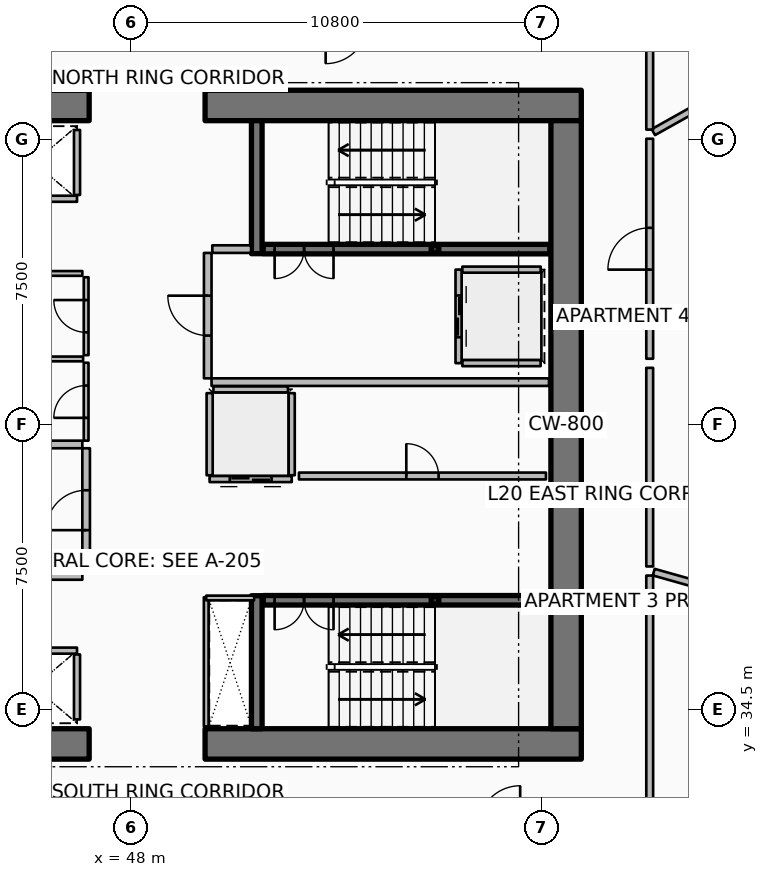
"""IFC4 building model, lengths in metres.
Left out: names, types, materials, properties, quantities, classifications, styles, units other than length and angle.
Written with IfcOpenShell. Run it as: python <this file> out.ifc"""

import sys

from ifc_helpers import new_model, si_unit, direction, frame, frame_2d, origin, origin_2d, place, context, subcontext, project, spatial, rectangle, hollow_rectangle, extrude, element, fill, save


model = new_model("IFC4")
c1 = context("Model", 3, precision=1e-05, world=origin(), true_north=direction((0.0, 1.0)))
c2 = subcontext(c1, "Body", "Model", "MODEL_VIEW")
j1 = project(units=[si_unit("LENGTHUNIT", "METRE"), si_unit("PLANEANGLEUNIT", "RADIAN")], contexts=[c1])
p1 = place(None, origin())
s1 = spatial("IfcSite", under=j1, at=p1, CompositionType="ELEMENT")
p2 = place(p1, origin())
s2 = spatial("IfcBuilding", under=s1, at=p2, CompositionType="ELEMENT")
p3 = place(p2, frame((0.0, 0.0, 82.65)))
s3 = spatial("IfcBuildingStorey", under=s2, at=p3, CompositionType="ELEMENT", Elevation=82.65)
p4 = place(p3, frame((37.0, 33.6, 0.0), z_axis=(0.0, 0.0, 1.0), x_axis=(1.0, 0.0, 0.0)))
e1 = element("IfcWall", 1, at=p4, inside=s3, PredefinedType="SHEAR", context=c2, shape_type="SweptSolid", body=[
    extrude(rectangle(XDim=9.9, YDim=0.8, at=frame_2d((4.95, 0.0))), origin(), (0.0, 0.0, 1.0), 3.75),
])
p5 = place(p3, frame((49.95, 33.6, 0.0), z_axis=(0.0, 0.0, 1.0), x_axis=(1.0, 0.0, 0.0)))
e2 = element("IfcWall", 2, at=p5, inside=s3, PredefinedType="SHEAR", context=c2, shape_type="SweptSolid", body=[
    extrude(rectangle(XDim=9.9, YDim=0.8, at=frame_2d((4.95, 0.0))), origin(), (0.0, 0.0, 1.0), 3.75),
])
p6 = place(p3, frame((37.0, 50.4, 0.0), z_axis=(0.0, 0.0, 1.0), x_axis=(1.0, 0.0, 0.0)))
e3 = element("IfcWall", 3, at=p6, inside=s3, PredefinedType="SHEAR", context=c2, shape_type="SweptSolid", body=[
    extrude(rectangle(XDim=9.9, YDim=0.8, at=frame_2d((4.95, 0.0))), origin(), (0.0, 0.0, 1.0), 3.75),
])
p7 = place(p3, frame((49.95, 50.4, 0.0), z_axis=(0.0, 0.0, 1.0), x_axis=(1.0, 0.0, 0.0)))
e4 = element("IfcWall", 4, at=p7, inside=s3, PredefinedType="SHEAR", context=c2, shape_type="SweptSolid", body=[
    extrude(rectangle(XDim=9.9, YDim=0.8, at=frame_2d((4.95, 0.0))), origin(), (0.0, 0.0, 1.0), 3.75),
])
p8 = place(p3, frame((59.45, 34.0, 0.0), z_axis=(0.0, 0.0, 1.0), x_axis=(0.0, 1.0, 0.0)))
e5 = element("IfcWall", 5, at=p8, inside=s3, PredefinedType="SHEAR", context=c2, shape_type="SweptSolid", body=[
    extrude(rectangle(XDim=16.0, YDim=0.8, at=frame_2d((8.0, 0.0))), origin(), (0.0, 0.0, 1.0), 3.75),
])
for number, where, z_axis, x_axis in (
    (6, (51.31, 46.5, 0.0), (0.0, 0.0, 1.0), (0.0, 1.0, 0.0)),
    (7, (51.31, 34.0, 0.0), (0.0, 0.0, 1.0), (0.0, 1.0, 0.0)),
):
    element("IfcWall", number, at=place(p3, frame(where, z_axis=z_axis, x_axis=x_axis)), inside=s3, PredefinedType="SHEAR", context=c2, shape_type="SweptSolid", body=[
        extrude(rectangle(XDim=3.5, YDim=0.28, at=frame_2d((1.75, 0.0))), origin(), (0.0, 0.0, 1.0), 3.75),
    ])
for number, where, z_axis, x_axis in (
    (8, (56.0, 46.62, 0.0), (0.0, 0.0, 1.0), (1.0, 0.0, 0.0)),
    (9, (56.0, 37.38, 0.0), (0.0, 0.0, 1.0), (1.0, 0.0, 0.0)),
):
    element("IfcColumn", number, at=place(p3, frame(where, z_axis=z_axis, x_axis=x_axis)), inside=s3, PredefinedType="COLUMN", context=c2, shape_type="SweptSolid", body=[
        extrude(hollow_rectangle(XDim=0.2, YDim=0.2, WallThickness=0.01, InnerFilletRadius=0.01, OuterFilletRadius=0.02, at=origin_2d()), origin(), (0.0, 0.0, 1.0), 1.67),
    ])
p9 = place(p3, frame((51.48, 46.62, 0.0), z_axis=(0.0, 0.0, 1.0), x_axis=(1.0, 0.0, 0.0)))
e10 = element("IfcWall", 10, at=p9, inside=s3, PredefinedType="SOLIDWALL", context=c2, shape_type="SweptSolid", body=[
    extrude(rectangle(XDim=7.54, YDim=0.25, at=frame_2d((3.77, 0.0))), origin(), (0.0, 0.0, 1.0), 3.5),
])
p10 = place(p9, frame((0.3, 0.0, 0.0)))
e11 = element("IfcOpeningElement", 11, at=p10, cuts=e10, PredefinedType="OPENING", context=c2, shape_type="SweptSolid", body=[
    extrude(rectangle(XDim=1.55, YDim=2.15, at=frame_2d((0.775, 1.075))), frame((0.0, 0.135, 0.0), z_axis=(0.0, -1.0, 0.0), x_axis=(1.0, 0.0, 0.0)), (0.0, 0.0, 1.0), 0.27),
])
p11 = place(p3, frame((51.48, 37.38, 0.0), z_axis=(0.0, 0.0, 1.0), x_axis=(1.0, 0.0, 0.0)))
e12 = element("IfcWall", 12, at=p11, inside=s3, PredefinedType="SOLIDWALL", context=c2, shape_type="SweptSolid", body=[
    extrude(rectangle(XDim=7.54, YDim=0.25, at=frame_2d((3.77, 0.0))), origin(), (0.0, 0.0, 1.0), 3.5),
])
p12 = place(p11, frame((0.3, 0.0, 0.0)))
e13 = element("IfcOpeningElement", 13, at=p12, cuts=e12, PredefinedType="OPENING", context=c2, shape_type="SweptSolid", body=[
    extrude(rectangle(XDim=1.55, YDim=2.15, at=frame_2d((0.775, 1.075))), frame((0.0, 0.135, 0.0), z_axis=(0.0, -1.0, 0.0), x_axis=(1.0, 0.0, 0.0)), (0.0, 0.0, 1.0), 0.27),
])
p13 = place(p3, frame((46.58, 47.945, 0.0), z_axis=(0.0, 0.0, 1.0), x_axis=(-1.0, 0.0, 0.0)))
e14 = element("IfcWall", 14, at=p13, inside=s3, PredefinedType="PARTITIONING", context=c2, shape_type="SweptSolid", body=[
    extrude(rectangle(XDim=2.26, YDim=0.16, at=frame_2d((1.13, 0.0))), origin(), (0.0, 0.0, 1.0), 3.5),
])
p14 = place(p3, frame((46.58, 48.045, 0.0), z_axis=(0.0, 0.0, 1.0), x_axis=(0.0, 1.0, 0.0)))
e15 = element("IfcWall", 15, at=p14, inside=s3, PredefinedType="PARTITIONING", context=c2, shape_type="SweptSolid", body=[
    extrude(rectangle(XDim=1.71, YDim=0.16, at=frame_2d((0.855, 0.0))), origin(), (0.0, 0.0, 1.0), 3.5),
])
p15 = place(p3, frame((44.32, 36.055, 0.0), z_axis=(0.0, 0.0, 1.0), x_axis=(1.0, 0.0, 0.0)))
e16 = element("IfcWall", 16, at=p15, inside=s3, PredefinedType="PARTITIONING", context=c2, shape_type="SweptSolid", body=[
    extrude(rectangle(XDim=2.26, YDim=0.16, at=frame_2d((1.13, 0.0))), origin(), (0.0, 0.0, 1.0), 3.5),
])
p16 = place(p3, frame((46.58, 34.245, 0.0), z_axis=(0.0, 0.0, 1.0), x_axis=(0.0, 1.0, 0.0)))
e17 = element("IfcWall", 17, at=p16, inside=s3, PredefinedType="PARTITIONING", context=c2, shape_type="SweptSolid", body=[
    extrude(rectangle(XDim=1.71, YDim=0.16, at=frame_2d((0.855, 0.0))), origin(), (0.0, 0.0, 1.0), 3.5),
])
p17 = place(p3, frame((56.62, 46.08, 0.0), z_axis=(0.0, 0.0, 1.0), x_axis=(0.0, -1.0, 0.0)))
e18 = element("IfcWall", 18, at=p17, inside=s3, PredefinedType="PARTITIONING", context=c2, shape_type="SweptSolid", body=[
    extrude(rectangle(XDim=2.46, YDim=0.16, at=frame_2d((1.23, 0.0))), origin(), (0.0, 0.0, 1.0), 3.5),
])
p18 = place(p17, frame((0.68, 0.0, 0.0)))
e19 = element("IfcOpeningElement", 19, at=p18, cuts=e18, PredefinedType="OPENING", context=c2, shape_type="SweptSolid", body=[
    extrude(rectangle(XDim=1.1, YDim=2.1, at=frame_2d((0.55, 1.05))), frame((0.0, 0.09, 0.0), z_axis=(0.0, -1.0, 0.0), x_axis=(1.0, 0.0, 0.0)), (0.0, 0.0, 1.0), 0.18),
])
for number, where, z_axis, x_axis in (
    (20, (56.72, 46.08, 0.0), (0.0, 0.0, 1.0), (1.0, 0.0, 0.0)),
    (21, (56.72, 43.62, 0.0), (0.0, 0.0, 1.0), (1.0, 0.0, 0.0)),
):
    element("IfcWall", number, at=place(p3, frame(where, z_axis=z_axis, x_axis=x_axis)), inside=s3, PredefinedType="PARTITIONING", context=c2, shape_type="SweptSolid", body=[
        extrude(rectangle(XDim=2.06, YDim=0.16, at=frame_2d((1.03, 0.0))), origin(), (0.0, 0.0, 1.0), 3.5),
    ])
p19 = place(p3, frame((52.23, 40.57, 0.0), z_axis=(0.0, 0.0, 1.0), x_axis=(-1.0, 0.0, 0.0)))
e22 = element("IfcWall", 22, at=p19, inside=s3, PredefinedType="PARTITIONING", context=c2, shape_type="SweptSolid", body=[
    extrude(rectangle(XDim=2.16, YDim=0.16, at=frame_2d((1.08, 0.0))), origin(), (0.0, 0.0, 1.0), 3.5),
])
p20 = place(p19, frame((0.53, 0.0, 0.0)))
e23 = element("IfcOpeningElement", 23, at=p20, cuts=e22, PredefinedType="OPENING", context=c2, shape_type="SweptSolid", body=[
    extrude(rectangle(XDim=1.1, YDim=2.1, at=frame_2d((0.55, 1.05))), frame((0.0, 0.09, 0.0), z_axis=(0.0, -1.0, 0.0), x_axis=(1.0, 0.0, 0.0)), (0.0, 0.0, 1.0), 0.18),
])
for number, where, z_axis, x_axis in (
    (24, (52.23, 40.67, 0.0), (0.0, 0.0, 1.0), (0.0, 1.0, 0.0)),
    (25, (50.07, 40.67, 0.0), (0.0, 0.0, 1.0), (0.0, 1.0, 0.0)),
):
    element("IfcWall", number, at=place(p3, frame(where, z_axis=z_axis, x_axis=x_axis)), inside=s3, PredefinedType="PARTITIONING", context=c2, shape_type="SweptSolid", body=[
        extrude(rectangle(XDim=2.16, YDim=0.16, at=frame_2d((1.08, 0.0))), origin(), (0.0, 0.0, 1.0), 3.5),
    ])
p21 = place(p3, frame((50.17, 42.93, 0.0), z_axis=(0.0, 0.0, 1.0), x_axis=(1.0, 0.0, 0.0)))
e26 = element("IfcWall", 26, at=p21, inside=s3, PredefinedType="PARTITIONING", context=c2, shape_type="SweptSolid", body=[
    extrude(rectangle(XDim=1.96, YDim=0.16, at=frame_2d((0.98, 0.0))), origin(), (0.0, 0.0, 1.0), 3.5),
])
p22 = place(p3, frame((52.42, 40.65, 0.0), z_axis=(0.0, 0.0, 1.0), x_axis=(1.0, 0.0, 0.0)))
e27 = element("IfcWall", 27, at=p22, inside=s3, PredefinedType="PARTITIONING", context=c2, shape_type="SweptSolid", body=[
    extrude(rectangle(XDim=6.5, YDim=0.18, at=frame_2d((3.25, 0.0))), origin(), (0.0, 0.0, 1.0), 3.5),
])
p23 = place(p22, frame((2.825, 0.0, 0.0)))
e28 = element("IfcOpeningElement", 28, at=p23, cuts=e27, PredefinedType="OPENING", context=c2, shape_type="SweptSolid", body=[
    extrude(rectangle(XDim=0.85, YDim=2.06, at=frame_2d((0.425, 1.03))), frame((0.0, 0.1, 0.0), z_axis=(0.0, -1.0, 0.0), x_axis=(1.0, 0.0, 0.0)), (0.0, 0.0, 1.0), 0.2),
])
p24 = place(p3, frame((41.35, 38.02, 0.0), z_axis=(0.0, 0.0, 1.0), x_axis=(1.0, 0.0, 0.0)))
e29 = element("IfcWall", 29, at=p24, inside=s3, PredefinedType="PARTITIONING", context=c2, shape_type="SweptSolid", body=[
    extrude(rectangle(XDim=5.37, YDim=0.2, at=frame_2d((2.685, 0.0))), origin(), (0.0, 0.0, 1.0), 3.5),
])
p25 = place(p3, frame((43.92, 41.48, 0.0), z_axis=(0.0, 0.0, 1.0), x_axis=(1.0, 0.0, 0.0)))
e30 = element("IfcWall", 30, at=p25, inside=s3, PredefinedType="PARTITIONING", context=c2, shape_type="SweptSolid", body=[
    extrude(rectangle(XDim=2.8, YDim=0.2, at=frame_2d((1.4, 0.0))), origin(), (0.0, 0.0, 1.0), 3.5),
])
p26 = place(p3, frame((46.82, 38.12, 0.0), z_axis=(0.0, 0.0, 1.0), x_axis=(0.0, 1.0, 0.0)))
e31 = element("IfcWall", 31, at=p26, inside=s3, PredefinedType="PARTITIONING", context=c2, shape_type="SweptSolid", body=[
    extrude(rectangle(XDim=3.26, YDim=0.2, at=frame_2d((1.63, 0.0))), origin(), (0.0, 0.0, 1.0), 3.5),
])
p27 = place(p26, frame((1.105, 0.0, 0.0)))
e32 = element("IfcOpeningElement", 32, at=p27, cuts=e31, PredefinedType="OPENING", context=c2, shape_type="SweptSolid", body=[
    extrude(rectangle(XDim=1.05, YDim=2.1, at=frame_2d((0.525, 1.05))), frame((0.0, 0.11, 0.0), z_axis=(0.0, -1.0, 0.0), x_axis=(1.0, 0.0, 0.0)), (0.0, 0.0, 1.0), 0.22),
])
p28 = place(p3, frame((50.12, 43.12, 0.0), z_axis=(0.0, 0.0, 1.0), x_axis=(1.0, 0.0, 0.0)))
e33 = element("IfcWall", 33, at=p28, inside=s3, PredefinedType="PARTITIONING", context=c2, shape_type="SweptSolid", body=[
    extrude(rectangle(XDim=8.88, YDim=0.2, at=frame_2d((4.44, 0.0))), origin(), (0.0, 0.0, 1.0), 3.5),
])
p29 = place(p3, frame((50.14, 46.62, 0.0), z_axis=(0.0, 0.0, 1.0), x_axis=(1.0, 0.0, 0.0)))
e34 = element("IfcWall", 34, at=p29, inside=s3, PredefinedType="PARTITIONING", context=c2, shape_type="SweptSolid", body=[
    extrude(rectangle(XDim=1.02, YDim=0.2, at=frame_2d((0.51, 0.0))), origin(), (0.0, 0.0, 1.0), 3.5),
])
p30 = place(p3, frame((50.02, 43.22, 0.0), z_axis=(0.0, 0.0, 1.0), x_axis=(0.0, 1.0, 0.0)))
e35 = element("IfcWall", 35, at=p30, inside=s3, PredefinedType="PARTITIONING", context=c2, shape_type="SweptSolid", body=[
    extrude(rectangle(XDim=3.3, YDim=0.2, at=frame_2d((1.65, 0.0))), origin(), (0.0, 0.0, 1.0), 3.5),
])
p31 = place(p30, frame((1.125, 0.0, 0.0)))
e36 = element("IfcOpeningElement", 36, at=p31, cuts=e35, PredefinedType="OPENING", context=c2, shape_type="SweptSolid", body=[
    extrude(rectangle(XDim=1.05, YDim=2.1, at=frame_2d((0.525, 1.05))), frame((0.0, 0.11, 0.0), z_axis=(0.0, -1.0, 0.0), x_axis=(1.0, 0.0, 0.0)), (0.0, 0.0, 1.0), 0.22),
])
p32 = place(p3, frame((41.36, 45.98, 0.0), z_axis=(0.0, 0.0, 1.0), x_axis=(1.0, 0.0, 0.0)))
e37 = element("IfcWall", 37, at=p32, inside=s3, PredefinedType="PARTITIONING", context=c2, shape_type="SweptSolid", body=[
    extrude(rectangle(XDim=5.36, YDim=0.125, at=frame_2d((2.68, 0.0))), origin(), (0.0, 0.0, 1.0), 2.94),
])
p33 = place(p3, frame((49.98, 34.06, 0.0), z_axis=(0.0, 0.0, 1.0), x_axis=(0.0, 1.0, 0.0)))
e38 = element("IfcWall", 38, at=p33, inside=s3, PredefinedType="PARTITIONING", context=c2, shape_type="SweptSolid", body=[
    extrude(rectangle(XDim=3.4, YDim=0.125, at=frame_2d((1.7, 0.0))), origin(), (0.0, 0.0, 1.0), 2.94),
])
p34 = place(p3, frame((49.98, 37.44, 0.0), z_axis=(0.0, 0.0, 1.0), x_axis=(1.0, 0.0, 0.0)))
e39 = element("IfcWall", 39, at=p34, inside=s3, PredefinedType="PARTITIONING", context=c2, shape_type="SweptSolid", body=[
    extrude(rectangle(XDim=1.26, YDim=0.125, at=frame_2d((0.63, 0.0))), origin(), (0.0, 0.0, 1.0), 2.94),
])
p35 = place(p3, frame((44.03, 43.73, 0.0), z_axis=(0.0, 0.0, 1.0), x_axis=(1.0, 0.0, 0.0)))
e40 = element("IfcWall", 40, at=p35, inside=s3, PredefinedType="PARTITIONING", context=c2, shape_type="SweptSolid", body=[
    extrude(rectangle(XDim=2.71, YDim=0.125, at=frame_2d((1.355, 0.0))), origin(), (0.0, 0.0, 1.0), 2.94),
])
p36 = place(p3, frame((46.82, 41.58, 0.0), z_axis=(0.0, 0.0, 1.0), x_axis=(0.0, 1.0, 0.0)))
e41 = element("IfcWall", 41, at=p36, inside=s3, PredefinedType="PARTITIONING", context=c2, shape_type="SweptSolid", body=[
    extrude(rectangle(XDim=2.05, YDim=0.125, at=frame_2d((1.025, 0.0))), origin(), (0.0, 0.0, 1.0), 2.94),
])
p37 = place(p36, frame((0.6, 0.0, 0.0)))
e42 = element("IfcOpeningElement", 42, at=p37, cuts=e41, PredefinedType="OPENING", context=c2, shape_type="SweptSolid", body=[
    extrude(rectangle(XDim=0.85, YDim=2.06, at=frame_2d((0.425, 1.03))), frame((0.0, 0.073, 0.0), z_axis=(0.0, -1.0, 0.0), x_axis=(1.0, 0.0, 0.0)), (0.0, 0.0, 1.0), 0.145),
])
p38 = place(p3, frame((46.82, 43.83, 0.0), z_axis=(0.0, 0.0, 1.0), x_axis=(0.0, 1.0, 0.0)))
e43 = element("IfcWall", 43, at=p38, inside=s3, PredefinedType="PARTITIONING", context=c2, shape_type="SweptSolid", body=[
    extrude(rectangle(XDim=2.05, YDim=0.125, at=frame_2d((1.025, 0.0))), origin(), (0.0, 0.0, 1.0), 2.94),
])
p39 = place(p38, frame((0.6, 0.0, 0.0)))
e44 = element("IfcOpeningElement", 44, at=p39, cuts=e43, PredefinedType="OPENING", context=c2, shape_type="SweptSolid", body=[
    extrude(rectangle(XDim=0.85, YDim=2.06, at=frame_2d((0.425, 1.03))), frame((0.0, 0.073, 0.0), z_axis=(0.0, -1.0, 0.0), x_axis=(1.0, 0.0, 0.0)), (0.0, 0.0, 1.0), 0.145),
])
p40 = place(p3, frame((61.746, 49.698, 0.0), z_axis=(0.0, 0.0, 1.0), x_axis=(0.872489938668, 0.488632077256, 0.0)))
e45 = element("IfcWall", 45, at=p40, inside=s3, PredefinedType="PARTITIONING", context=c2, shape_type="SweptSolid", body=[
    extrude(rectangle(XDim=13.725, YDim=0.18, at=frame_2d((6.862, 0.0))), origin(), (0.0, 0.0, 1.0), 2.94),
])
p41 = place(p3, frame((61.756, 38.12, 0.0), z_axis=(0.0, 0.0, 1.0), x_axis=(0.962455861176, -0.271438234756, 0.0)))
e46 = element("IfcWall", 46, at=p41, inside=s3, PredefinedType="PARTITIONING", context=c2, shape_type="SweptSolid", body=[
    extrude(rectangle(XDim=14.279, YDim=0.18, at=frame_2d((7.139, 0.0))), origin(), (0.0, 0.0, 1.0), 2.94),
])
p42 = place(p3, frame((61.65, 31.52, 0.0), z_axis=(0.0, 0.0, 1.0), x_axis=(0.0, 1.0, 0.0)))
e47 = element("IfcWall", 47, at=p42, inside=s3, PredefinedType="PARTITIONING", context=c2, shape_type="SweptSolid", body=[
    extrude(rectangle(XDim=6.51, YDim=0.18, at=frame_2d((3.255, 0.0))), origin(), (0.0, 0.0, 1.0), 2.94),
])
p43 = place(p3, frame((61.65, 43.736, 0.0), z_axis=(0.0, 0.0, 1.0), x_axis=(0.0, 1.0, 0.0)))
e48 = element("IfcWall", 48, at=p43, inside=s3, PredefinedType="PARTITIONING", context=c2, shape_type="SweptSolid", body=[
    extrude(rectangle(XDim=5.789, YDim=0.18, at=frame_2d((2.895, 0.0))), origin(), (0.0, 0.0, 1.0), 2.94),
])
p44 = place(p43, frame((2.344, 0.0, 0.0)))
e49 = element("IfcOpeningElement", 49, at=p44, cuts=e48, PredefinedType="OPENING", context=c2, shape_type="SweptSolid", body=[
    extrude(rectangle(XDim=1.1, YDim=2.1, at=frame_2d((0.55, 1.05))), frame((0.0, 0.1, 0.0), z_axis=(0.0, -1.0, 0.0), x_axis=(1.0, 0.0, 0.0)), (0.0, 0.0, 1.0), 0.2),
])
p45 = place(p3, frame((61.65, 38.27, 0.0), z_axis=(0.0, 0.0, 1.0), x_axis=(0.0, 1.0, 0.0)))
e50 = element("IfcWall", 50, at=p45, inside=s3, PredefinedType="PARTITIONING", context=c2, shape_type="SweptSolid", body=[
    extrude(rectangle(XDim=5.225, YDim=0.18, at=frame_2d((2.613, 0.0))), origin(), (0.0, 0.0, 1.0), 2.94),
])
p46 = place(p3, frame((61.65, 49.764, 0.0), z_axis=(0.0, 0.0, 1.0), x_axis=(0.0, 1.0, 0.0)))
e51 = element("IfcWall", 51, at=p46, inside=s3, PredefinedType="PARTITIONING", context=c2, shape_type="SweptSolid", body=[
    extrude(rectangle(XDim=2.716, YDim=0.18, at=frame_2d((1.358, 0.0))), origin(), (0.0, 0.0, 1.0), 2.94),
])
p47 = place(p10, origin())
e52 = element("IfcDoor", 52, at=p47, inside=s3, OperationType="DOUBLE_DOOR_SINGLE_SWING", PredefinedType="DOOR", context=c2, shape_type="SweptSolid", body=[
    extrude(rectangle(XDim=1.55, YDim=2.15, at=frame_2d((0.775, 1.075))), frame((0.0, 0.025, 0.0), z_axis=(0.0, -1.0, 0.0), x_axis=(1.0, 0.0, 0.0)), (0.0, 0.0, 1.0), 0.05),
])
fill(e11, e52)
p48 = place(p12, origin())
e53 = element("IfcDoor", 53, at=p48, inside=s3, OperationType="DOUBLE_DOOR_SINGLE_SWING", PredefinedType="DOOR", context=c2, shape_type="SweptSolid", body=[
    extrude(rectangle(XDim=1.55, YDim=2.15, at=frame_2d((0.775, 1.075))), frame((0.0, 0.025, 0.0), z_axis=(0.0, -1.0, 0.0), x_axis=(1.0, 0.0, 0.0)), (0.0, 0.0, 1.0), 0.05),
])
fill(e13, e53)
p49 = place(p18, origin())
e54 = element("IfcDoor", 54, at=p49, inside=s3, OperationType="DOUBLE_DOOR_SLIDING", PredefinedType="DOOR", context=c2, shape_type="SweptSolid", body=[
    extrude(rectangle(XDim=1.1, YDim=2.1, at=frame_2d((0.55, 1.05))), frame((0.0, 0.025, 0.0), z_axis=(0.0, -1.0, 0.0), x_axis=(1.0, 0.0, 0.0)), (0.0, 0.0, 1.0), 0.05),
])
fill(e19, e54)
p50 = place(p20, origin())
e55 = element("IfcDoor", 55, at=p50, inside=s3, OperationType="DOUBLE_DOOR_SLIDING", PredefinedType="DOOR", context=c2, shape_type="SweptSolid", body=[
    extrude(rectangle(XDim=1.1, YDim=2.1, at=frame_2d((0.55, 1.05))), frame((0.0, 0.025, 0.0), z_axis=(0.0, -1.0, 0.0), x_axis=(1.0, 0.0, 0.0)), (0.0, 0.0, 1.0), 0.05),
])
fill(e23, e55)
p51 = place(p23, origin())
e56 = element("IfcDoor", 56, at=p51, inside=s3, OperationType="SINGLE_SWING_LEFT", PredefinedType="DOOR", context=c2, shape_type="SweptSolid", body=[
    extrude(rectangle(XDim=0.85, YDim=2.06, at=frame_2d((0.425, 1.03))), frame((0.0, 0.025, 0.0), z_axis=(0.0, -1.0, 0.0), x_axis=(1.0, 0.0, 0.0)), (0.0, 0.0, 1.0), 0.05),
])
fill(e28, e56)
p52 = place(p27, origin())
e57 = element("IfcDoor", 57, at=p52, inside=s3, OperationType="SINGLE_SWING_LEFT", PredefinedType="DOOR", context=c2, shape_type="SweptSolid", body=[
    extrude(rectangle(XDim=1.05, YDim=2.1, at=frame_2d((0.525, 1.05))), frame((0.0, 0.025, 0.0), z_axis=(0.0, -1.0, 0.0), x_axis=(1.0, 0.0, 0.0)), (0.0, 0.0, 1.0), 0.05),
])
fill(e32, e57)
p53 = place(p31, origin())
e58 = element("IfcDoor", 58, at=p53, inside=s3, OperationType="SINGLE_SWING_RIGHT", PredefinedType="DOOR", context=c2, shape_type="SweptSolid", body=[
    extrude(rectangle(XDim=1.05, YDim=2.1, at=frame_2d((0.525, 1.05))), frame((0.0, 0.025, 0.0), z_axis=(0.0, -1.0, 0.0), x_axis=(1.0, 0.0, 0.0)), (0.0, 0.0, 1.0), 0.05),
])
fill(e36, e58)
p54 = place(p37, origin())
e59 = element("IfcDoor", 59, at=p54, inside=s3, OperationType="SINGLE_SWING_LEFT", PredefinedType="DOOR", context=c2, shape_type="SweptSolid", body=[
    extrude(rectangle(XDim=0.85, YDim=2.06, at=frame_2d((0.425, 1.03))), frame((0.0, 0.025, 0.0), z_axis=(0.0, -1.0, 0.0), x_axis=(1.0, 0.0, 0.0)), (0.0, 0.0, 1.0), 0.05),
])
fill(e42, e59)
p55 = place(p39, origin())
e60 = element("IfcDoor", 60, at=p55, inside=s3, OperationType="SINGLE_SWING_RIGHT", PredefinedType="DOOR", context=c2, shape_type="SweptSolid", body=[
    extrude(rectangle(XDim=0.85, YDim=2.06, at=frame_2d((0.425, 1.03))), frame((0.0, 0.025, 0.0), z_axis=(0.0, -1.0, 0.0), x_axis=(1.0, 0.0, 0.0)), (0.0, 0.0, 1.0), 0.05),
])
fill(e44, e60)
p56 = place(p44, origin())
e61 = element("IfcDoor", 61, at=p56, inside=s3, OperationType="SINGLE_SWING_LEFT", PredefinedType="DOOR", context=c2, shape_type="SweptSolid", body=[
    extrude(rectangle(XDim=1.1, YDim=2.1, at=frame_2d((0.55, 1.05))), frame((0.0, 0.025, 0.0), z_axis=(0.0, -1.0, 0.0), x_axis=(1.0, 0.0, 0.0)), (0.0, 0.0, 1.0), 0.05),
])
fill(e49, e61)
save(model, sys.argv[1])
